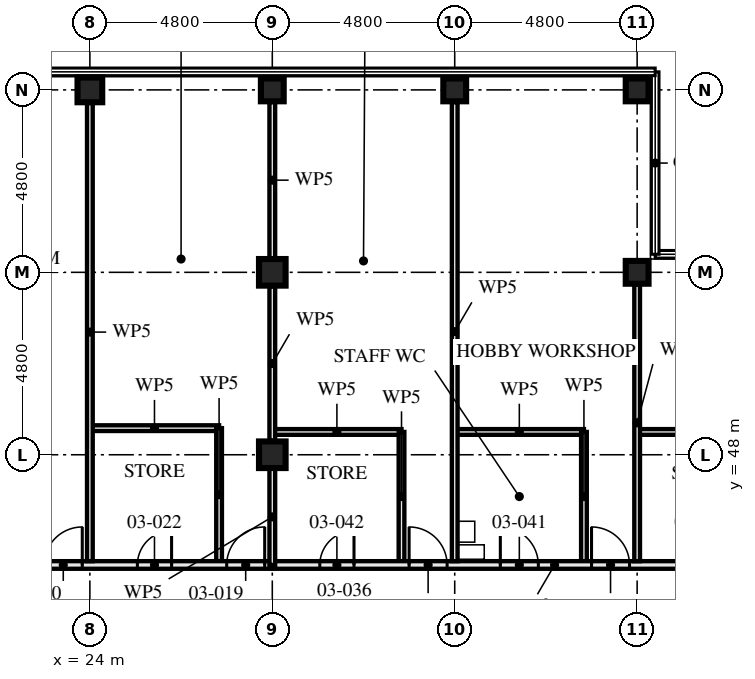
"""IFC4 building model, lengths in metres.
Left out: names, types, materials, properties, quantities, classifications, styles, units other than length and angle.
Written with IfcOpenShell. Run it as: python <this file> out.ifc"""

import sys

from ifc_helpers import new_model, si_unit, direction, frame, frame_2d, origin, origin_2d, place, context, subcontext, project, spatial, rectangle, hollow_rectangle, extrude, element, fill, save


model = new_model("IFC4")
c1 = context("Model", 3, precision=1e-05, world=origin(), true_north=direction((0.0, 1.0)))
c2 = subcontext(c1, "Body", "Model", "MODEL_VIEW")
j1 = project(units=[si_unit("LENGTHUNIT", "METRE"), si_unit("PLANEANGLEUNIT", "RADIAN")], contexts=[c1])
p1 = place(None, origin())
s1 = spatial("IfcSite", under=j1, at=p1, CompositionType="ELEMENT")
p2 = place(p1, origin())
s2 = spatial("IfcBuilding", under=s1, at=p2, CompositionType="ELEMENT")
p3 = place(p2, frame((0.0, 0.0, 13.5)))
s3 = spatial("IfcBuildingStorey", under=s2, at=p3, CompositionType="ELEMENT", Elevation=13.5)
p4 = place(p3, frame((24.0, 57.6, 0.0), z_axis=(0.0, 0.0, 1.0), x_axis=(0.0, 1.0, 0.0)))
e1 = element("IfcColumn", 1, at=p4, inside=s3, PredefinedType="COLUMN", context=c2, shape_type="SweptSolid", body=[
    extrude(hollow_rectangle(XDim=0.65, YDim=0.65, WallThickness=0.08, at=origin_2d()), origin(), (0.0, 0.0, 1.0), 4.5),
])
for number, where, z_axis, x_axis in (
    (2, (28.8, 48.0, 0.0), (0.0, 0.0, 1.0), (1.0, 0.0, 0.0)),
    (3, (28.8, 52.8, 0.0), (0.0, 0.0, 1.0), (1.0, 0.0, 0.0)),
):
    element("IfcColumn", number, at=place(p3, frame(where, z_axis=z_axis, x_axis=x_axis)), inside=s3, PredefinedType="COLUMN", context=c2, shape_type="SweptSolid", body=[
        extrude(hollow_rectangle(XDim=0.7, YDim=0.7, WallThickness=0.06, at=origin_2d()), origin(), (0.0, 0.0, 1.0), 4.5),
    ])
for number, where, z_axis, x_axis in (
    (4, (28.8, 57.6, 0.0), (0.0, 0.0, 1.0), (0.0, 1.0, 0.0)),
    (5, (33.6, 57.6, 0.0), (0.0, 0.0, 1.0), (0.0, 1.0, 0.0)),
):
    element("IfcColumn", number, at=place(p3, frame(where, z_axis=z_axis, x_axis=x_axis)), inside=s3, PredefinedType="COLUMN", context=c2, shape_type="SweptSolid", body=[
        extrude(hollow_rectangle(XDim=0.6, YDim=0.6, WallThickness=0.08, at=origin_2d()), origin(), (0.0, 0.0, 1.0), 4.5),
    ])
for number, where, z_axis, x_axis in (
    (6, (38.4, 52.8, 0.0), (0.0, 0.0, 1.0), (0.0, 1.0, 0.0)),
    (7, (38.4, 57.6, 0.0), (0.0, 0.0, 1.0), (0.0, 1.0, 0.0)),
):
    element("IfcColumn", number, at=place(p3, frame(where, z_axis=z_axis, x_axis=x_axis)), inside=s3, PredefinedType="COLUMN", context=c2, shape_type="SweptSolid", body=[
        extrude(hollow_rectangle(XDim=0.6, YDim=0.6, WallThickness=0.06, at=origin_2d()), origin(), (0.0, 0.0, 1.0), 4.5),
    ])
p5 = place(p3, frame((27.4, 48.7, 0.0), z_axis=(0.0, 0.0, 1.0), x_axis=(0.0, -1.0, 0.0)))
e8 = element("IfcWall", 8, at=p5, inside=s3, PredefinedType="PARTITIONING", context=c2, shape_type="SweptSolid", body=[
    extrude(rectangle(XDim=3.5, YDim=0.15, at=frame_2d((1.75, 0.0))), origin(), (0.0, 0.0, 1.0), 3.55),
])
p6 = place(p3, frame((27.4, 48.7, 0.0), z_axis=(0.0, 0.0, 1.0), x_axis=(-1.0, 0.0, 0.0)))
e9 = element("IfcWall", 9, at=p6, inside=s3, PredefinedType="PARTITIONING", context=c2, shape_type="SweptSolid", body=[
    extrude(rectangle(XDim=3.4, YDim=0.15, at=frame_2d((1.7, 0.0))), origin(), (0.0, 0.0, 1.0), 4.33),
])
p7 = place(p3, frame((24.0, 57.255, 0.0), z_axis=(0.0, 0.0, 1.0), x_axis=(0.0, -1.0, 0.0)))
e10 = element("IfcWall", 10, at=p7, inside=s3, PredefinedType="PARTITIONING", context=c2, shape_type="SweptSolid", body=[
    extrude(rectangle(XDim=12.055, YDim=0.15, at=frame_2d((6.027, 0.0))), origin(), (0.0, 0.0, 1.0), 3.55),
])
p8 = place(p3, frame((28.8, 45.1, 0.0), z_axis=(0.0, 0.0, 1.0), x_axis=(-1.0, 0.0, 0.0)))
e11 = element("IfcWall", 11, at=p8, inside=s3, PredefinedType="PARTITIONING", context=c2, shape_type="SweptSolid", body=[
    extrude(rectangle(XDim=14.4, YDim=0.2, at=frame_2d((7.2, 0.0))), origin(), (0.0, 0.0, 1.0), 4.33),
])
p9 = place(p8, frame((0.2, 0.0, 0.0)))
e12 = element("IfcOpeningElement", 12, at=p9, cuts=e11, PredefinedType="OPENING", context=c2, shape_type="SweptSolid", body=[
    extrude(rectangle(XDim=1.0, YDim=2.4, at=frame_2d((0.5, 1.2))), frame((0.0, 0.111, 0.0), z_axis=(0.0, -1.0, 0.0), x_axis=(1.0, 0.0, 0.0)), (0.0, 0.0, 1.0), 0.221),
])
p10 = place(p8, frame((5.0, 0.0, 0.0)))
e13 = element("IfcOpeningElement", 13, at=p10, cuts=e11, PredefinedType="OPENING", context=c2, shape_type="SweptSolid", body=[
    extrude(rectangle(XDim=1.0, YDim=2.4, at=frame_2d((0.5, 1.2))), frame((0.0, 0.111, 0.0), z_axis=(0.0, -1.0, 0.0), x_axis=(1.0, 0.0, 0.0)), (0.0, 0.0, 1.0), 0.221),
])
p11 = place(p8, frame((9.8, 0.0, 0.0)))
e14 = element("IfcOpeningElement", 14, at=p11, cuts=e11, PredefinedType="OPENING", context=c2, shape_type="SweptSolid", body=[
    extrude(rectangle(XDim=1.0, YDim=2.4, at=frame_2d((0.5, 1.2))), frame((0.0, 0.111, 0.0), z_axis=(0.0, -1.0, 0.0), x_axis=(1.0, 0.0, 0.0)), (0.0, 0.0, 1.0), 0.221),
])
p12 = place(p8, frame((2.65, 0.0, 0.0)))
e15 = element("IfcOpeningElement", 15, at=p12, cuts=e11, PredefinedType="OPENING", context=c2, shape_type="SweptSolid", body=[
    extrude(rectangle(XDim=0.9, YDim=2.1, at=frame_2d((0.45, 1.05))), frame((0.0, 0.111, 0.0), z_axis=(0.0, -1.0, 0.0), x_axis=(1.0, 0.0, 0.0)), (0.0, 0.0, 1.0), 0.221),
])
p13 = place(p8, frame((7.4, 0.0, 0.0)))
e16 = element("IfcOpeningElement", 16, at=p13, cuts=e11, PredefinedType="OPENING", context=c2, shape_type="SweptSolid", body=[
    extrude(rectangle(XDim=1.0, YDim=2.1, at=frame_2d((0.5, 1.05))), frame((0.0, 0.111, 0.0), z_axis=(0.0, -1.0, 0.0), x_axis=(1.0, 0.0, 0.0)), (0.0, 0.0, 1.0), 0.221),
])
p14 = place(p8, frame((12.25, 0.0, 0.0)))
e17 = element("IfcOpeningElement", 17, at=p14, cuts=e11, PredefinedType="OPENING", context=c2, shape_type="SweptSolid", body=[
    extrude(rectangle(XDim=0.9, YDim=2.1, at=frame_2d((0.45, 1.05))), frame((0.0, 0.111, 0.0), z_axis=(0.0, -1.0, 0.0), x_axis=(1.0, 0.0, 0.0)), (0.0, 0.0, 1.0), 0.221),
])
p15 = place(p3, frame((41.8, 48.6, 0.0), z_axis=(0.0, 0.0, 1.0), x_axis=(-1.0, 0.0, 0.0)))
e18 = element("IfcWall", 18, at=p15, inside=s3, PredefinedType="PARTITIONING", context=c2, shape_type="SweptSolid", body=[
    extrude(rectangle(XDim=3.4, YDim=0.15, at=frame_2d((1.7, 0.0))), origin(), (0.0, 0.0, 1.0), 4.33),
])
p16 = place(p3, frame((37.0, 48.6, 0.0), z_axis=(0.0, 0.0, 1.0), x_axis=(0.0, -1.0, 0.0)))
e19 = element("IfcWall", 19, at=p16, inside=s3, PredefinedType="PARTITIONING", context=c2, shape_type="SweptSolid", body=[
    extrude(rectangle(XDim=3.4, YDim=0.15, at=frame_2d((1.7, 0.0))), origin(), (0.0, 0.0, 1.0), 3.55),
])
p17 = place(p3, frame((37.0, 48.6, 0.0), z_axis=(0.0, 0.0, 1.0), x_axis=(-1.0, 0.0, 0.0)))
e20 = element("IfcWall", 20, at=p17, inside=s3, PredefinedType="PARTITIONING", context=c2, shape_type="SweptSolid", body=[
    extrude(rectangle(XDim=3.4, YDim=0.15, at=frame_2d((1.7, 0.0))), origin(), (0.0, 0.0, 1.0), 4.33),
])
p18 = place(p3, frame((32.2, 48.6, 0.0), z_axis=(0.0, 0.0, 1.0), x_axis=(0.0, -1.0, 0.0)))
e21 = element("IfcWall", 21, at=p18, inside=s3, PredefinedType="PARTITIONING", context=c2, shape_type="SweptSolid", body=[
    extrude(rectangle(XDim=3.4, YDim=0.15, at=frame_2d((1.7, 0.0))), origin(), (0.0, 0.0, 1.0), 3.55),
])
p19 = place(p3, frame((32.2, 48.6, 0.0), z_axis=(0.0, 0.0, 1.0), x_axis=(-1.0, 0.0, 0.0)))
e22 = element("IfcWall", 22, at=p19, inside=s3, PredefinedType="PARTITIONING", context=c2, shape_type="SweptSolid", body=[
    extrude(rectangle(XDim=3.4, YDim=0.15, at=frame_2d((1.7, 0.0))), origin(), (0.0, 0.0, 1.0), 4.33),
])
p20 = place(p3, frame((38.4, 52.48, 0.0), z_axis=(0.0, 0.0, 1.0), x_axis=(0.0, -1.0, 0.0)))
e23 = element("IfcWall", 23, at=p20, inside=s3, PredefinedType="PARTITIONING", context=c2, shape_type="SweptSolid", body=[
    extrude(rectangle(XDim=7.28, YDim=0.15, at=frame_2d((3.64, 0.0))), origin(), (0.0, 0.0, 1.0), 3.55),
])
p21 = place(p3, frame((33.6, 57.28, 0.0), z_axis=(0.0, 0.0, 1.0), x_axis=(0.0, -1.0, 0.0)))
e24 = element("IfcWall", 24, at=p21, inside=s3, PredefinedType="PARTITIONING", context=c2, shape_type="SweptSolid", body=[
    extrude(rectangle(XDim=12.08, YDim=0.15, at=frame_2d((6.04, 0.0))), origin(), (0.0, 0.0, 1.0), 3.55),
])
p22 = place(p3, frame((43.655, 45.1, 0.0), z_axis=(0.0, 0.0, 1.0), x_axis=(-1.0, 0.0, 0.0)))
e25 = element("IfcWall", 25, at=p22, inside=s3, PredefinedType="PARTITIONING", context=c2, shape_type="SweptSolid", body=[
    extrude(rectangle(XDim=14.855, YDim=0.2, at=frame_2d((7.427, 0.0))), origin(), (0.0, 0.0, 1.0), 3.32),
])
p23 = place(p22, frame((0.655, 0.0, 0.0)))
e26 = element("IfcOpeningElement", 26, at=p23, cuts=e25, PredefinedType="OPENING", context=c2, shape_type="SweptSolid", body=[
    extrude(rectangle(XDim=1.0, YDim=2.4, at=frame_2d((0.5, 1.2))), frame((0.0, 0.111, 0.0), z_axis=(0.0, -1.0, 0.0), x_axis=(1.0, 0.0, 0.0)), (0.0, 0.0, 1.0), 0.221),
])
p24 = place(p22, frame((5.455, 0.0, 0.0)))
e27 = element("IfcOpeningElement", 27, at=p24, cuts=e25, PredefinedType="OPENING", context=c2, shape_type="SweptSolid", body=[
    extrude(rectangle(XDim=1.0, YDim=2.4, at=frame_2d((0.5, 1.2))), frame((0.0, 0.111, 0.0), z_axis=(0.0, -1.0, 0.0), x_axis=(1.0, 0.0, 0.0)), (0.0, 0.0, 1.0), 0.221),
])
p25 = place(p22, frame((10.255, 0.0, 0.0)))
e28 = element("IfcOpeningElement", 28, at=p25, cuts=e25, PredefinedType="OPENING", context=c2, shape_type="SweptSolid", body=[
    extrude(rectangle(XDim=1.0, YDim=2.4, at=frame_2d((0.5, 1.2))), frame((0.0, 0.111, 0.0), z_axis=(0.0, -1.0, 0.0), x_axis=(1.0, 0.0, 0.0)), (0.0, 0.0, 1.0), 0.221),
])
p26 = place(p22, frame((3.105, 0.0, 0.0)))
e29 = element("IfcOpeningElement", 29, at=p26, cuts=e25, PredefinedType="OPENING", context=c2, shape_type="SweptSolid", body=[
    extrude(rectangle(XDim=0.9, YDim=2.1, at=frame_2d((0.45, 1.05))), frame((0.0, 0.111, 0.0), z_axis=(0.0, -1.0, 0.0), x_axis=(1.0, 0.0, 0.0)), (0.0, 0.0, 1.0), 0.221),
])
p27 = place(p22, frame((7.855, 0.0, 0.0)))
e30 = element("IfcOpeningElement", 30, at=p27, cuts=e25, PredefinedType="OPENING", context=c2, shape_type="SweptSolid", body=[
    extrude(rectangle(XDim=1.0, YDim=2.1, at=frame_2d((0.5, 1.05))), frame((0.0, 0.111, 0.0), z_axis=(0.0, -1.0, 0.0), x_axis=(1.0, 0.0, 0.0)), (0.0, 0.0, 1.0), 0.221),
])
p28 = place(p22, frame((12.705, 0.0, 0.0)))
e31 = element("IfcOpeningElement", 31, at=p28, cuts=e25, PredefinedType="OPENING", context=c2, shape_type="SweptSolid", body=[
    extrude(rectangle(XDim=0.9, YDim=2.1, at=frame_2d((0.45, 1.05))), frame((0.0, 0.111, 0.0), z_axis=(0.0, -1.0, 0.0), x_axis=(1.0, 0.0, 0.0)), (0.0, 0.0, 1.0), 0.221),
])
p29 = place(p3, frame((28.8, 45.1, 0.0), z_axis=(0.0, 0.0, 1.0), x_axis=(0.0, 1.0, 0.0)))
e32 = element("IfcWall", 32, at=p29, inside=s3, PredefinedType="PARTITIONING", context=c2, shape_type="SweptSolid", body=[
    extrude(rectangle(XDim=2.53, YDim=0.15, at=frame_2d((1.265, 0.0))), origin(), (0.0, 0.0, 1.0), 3.32),
])
p30 = place(p3, frame((28.8, 48.37, 0.0), z_axis=(0.0, 0.0, 1.0), x_axis=(0.0, 1.0, 0.0)))
e33 = element("IfcWall", 33, at=p30, inside=s3, PredefinedType="PARTITIONING", context=c2, shape_type="SweptSolid", body=[
    extrude(rectangle(XDim=4.06, YDim=0.15, at=frame_2d((2.03, 0.0))), origin(), (0.0, 0.0, 1.0), 3.32),
])
p31 = place(p3, frame((28.8, 53.17, 0.0), z_axis=(0.0, 0.0, 1.0), x_axis=(0.0, 1.0, 0.0)))
e34 = element("IfcWall", 34, at=p31, inside=s3, PredefinedType="PARTITIONING", context=c2, shape_type="SweptSolid", body=[
    extrude(rectangle(XDim=4.11, YDim=0.15, at=frame_2d((2.055, 0.0))), origin(), (0.0, 0.0, 1.0), 3.32),
])
p32 = place(p9, frame((1.0, 0.0, 0.0), z_axis=(0.0, 0.0, 1.0), x_axis=(-1.0, 0.0, 0.0)))
e35 = element("IfcDoor", 35, at=p32, inside=s3, OperationType="SINGLE_SWING_LEFT", PredefinedType="DOOR", context=c2, shape_type="SweptSolid", body=[
    extrude(rectangle(XDim=1.0, YDim=2.4, at=frame_2d((0.5, 1.2))), frame((0.0, 0.027, 0.0), z_axis=(0.0, -1.0, 0.0), x_axis=(1.0, 0.0, 0.0)), (0.0, 0.0, 1.0), 0.054),
])
fill(e12, e35)
p33 = place(p10, frame((1.0, 0.0, 0.0), z_axis=(0.0, 0.0, 1.0), x_axis=(-1.0, 0.0, 0.0)))
e36 = element("IfcDoor", 36, at=p33, inside=s3, OperationType="SINGLE_SWING_LEFT", PredefinedType="DOOR", context=c2, shape_type="SweptSolid", body=[
    extrude(rectangle(XDim=1.0, YDim=2.4, at=frame_2d((0.5, 1.2))), frame((0.0, 0.027, 0.0), z_axis=(0.0, -1.0, 0.0), x_axis=(1.0, 0.0, 0.0)), (0.0, 0.0, 1.0), 0.054),
])
fill(e13, e36)
p34 = place(p12, frame((0.9, 0.0, 0.0), z_axis=(0.0, 0.0, 1.0), x_axis=(-1.0, 0.0, 0.0)))
e37 = element("IfcDoor", 37, at=p34, inside=s3, OperationType="SINGLE_SWING_LEFT", PredefinedType="DOOR", context=c2, shape_type="SweptSolid", body=[
    extrude(rectangle(XDim=0.9, YDim=2.1, at=frame_2d((0.45, 1.05))), frame((0.0, 0.027, 0.0), z_axis=(0.0, -1.0, 0.0), x_axis=(1.0, 0.0, 0.0)), (0.0, 0.0, 1.0), 0.054),
])
fill(e15, e37)
p35 = place(p24, frame((1.0, 0.0, 0.0), z_axis=(0.0, 0.0, 1.0), x_axis=(-1.0, 0.0, 0.0)))
e38 = element("IfcDoor", 38, at=p35, inside=s3, OperationType="SINGLE_SWING_RIGHT", PredefinedType="DOOR", context=c2, shape_type="SweptSolid", body=[
    extrude(rectangle(XDim=1.0, YDim=2.4, at=frame_2d((0.5, 1.2))), frame((0.0, 0.027, 0.0), z_axis=(0.0, -1.0, 0.0), x_axis=(1.0, 0.0, 0.0)), (0.0, 0.0, 1.0), 0.054),
])
fill(e27, e38)
p36 = place(p25, frame((1.0, 0.0, 0.0), z_axis=(0.0, 0.0, 1.0), x_axis=(-1.0, 0.0, 0.0)))
e39 = element("IfcDoor", 39, at=p36, inside=s3, OperationType="SINGLE_SWING_RIGHT", PredefinedType="DOOR", context=c2, shape_type="SweptSolid", body=[
    extrude(rectangle(XDim=1.0, YDim=2.4, at=frame_2d((0.5, 1.2))), frame((0.0, 0.027, 0.0), z_axis=(0.0, -1.0, 0.0), x_axis=(1.0, 0.0, 0.0)), (0.0, 0.0, 1.0), 0.054),
])
fill(e28, e39)
p37 = place(p27, frame((1.0, 0.0, 0.0), z_axis=(0.0, 0.0, 1.0), x_axis=(-1.0, 0.0, 0.0)))
e40 = element("IfcDoor", 40, at=p37, inside=s3, OperationType="SINGLE_SWING_RIGHT", PredefinedType="DOOR", context=c2, shape_type="SweptSolid", body=[
    extrude(rectangle(XDim=1.0, YDim=2.1, at=frame_2d((0.5, 1.05))), frame((0.0, 0.027, 0.0), z_axis=(0.0, -1.0, 0.0), x_axis=(1.0, 0.0, 0.0)), (0.0, 0.0, 1.0), 0.054),
])
fill(e30, e40)
p38 = place(p28, frame((0.9, 0.0, 0.0), z_axis=(0.0, 0.0, 1.0), x_axis=(-1.0, 0.0, 0.0)))
e41 = element("IfcDoor", 41, at=p38, inside=s3, OperationType="SINGLE_SWING_LEFT", PredefinedType="DOOR", context=c2, shape_type="SweptSolid", body=[
    extrude(rectangle(XDim=0.9, YDim=2.1, at=frame_2d((0.45, 1.05))), frame((0.0, 0.027, 0.0), z_axis=(0.0, -1.0, 0.0), x_axis=(1.0, 0.0, 0.0)), (0.0, 0.0, 1.0), 0.054),
])
fill(e31, e41)
save(model, sys.argv[1])
